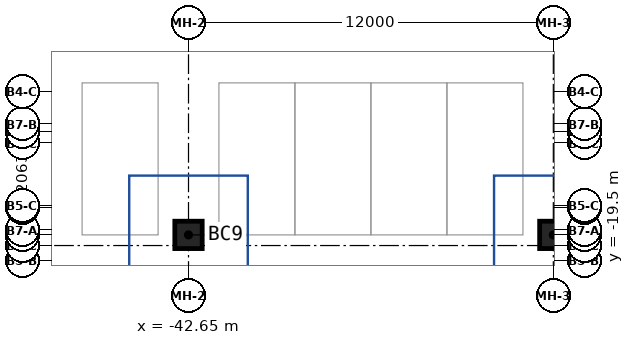
"""IFC4 building model, lengths in metres.
Left out: names, types, materials, properties, quantities, classifications, styles, units other than length and angle.
Written with IfcOpenShell. Run it as: python <this file> out.ifc"""

import sys

from ifc_helpers import new_model, si_unit, direction, frame, origin, origin_2d, place, context, subcontext, project, spatial, rectangle, extrude, source, transform, mapped, element, save


model = new_model("IFC4")
c1 = context("Model", 3, precision=1e-05, world=origin(), true_north=direction((0.0, 1.0)))
c2 = subcontext(c1, "Body", "Model", "MODEL_VIEW")
j1 = project(units=[si_unit("LENGTHUNIT", "METRE"), si_unit("PLANEANGLEUNIT", "RADIAN")], contexts=[c1])
p1 = place(None, origin())
s1 = spatial("IfcSite", under=j1, at=p1, CompositionType="ELEMENT")
p2 = place(p1, origin())
s2 = spatial("IfcBuilding", under=s1, at=p2, CompositionType="ELEMENT")
p3 = place(p2, frame((0.0, 0.0, -9.0)))
s3 = spatial("IfcBuildingStorey", under=s2, at=p3, CompositionType="ELEMENT", Elevation=-9.0)
m1 = source(origin(), c2, "Body", "SweptSolid", [
    extrude(rectangle(XDim=0.9, YDim=0.9, at=origin_2d()), origin(), (0.0, 0.0, 1.0), 4.5),
])
for number, where, z_axis, x_axis in (
    (1, (-42.65, -18.65, 0.0), (0.0, 0.0, 1.0), (1.0, 0.0, 0.0)),
    (2, (-30.65, -18.65, 0.0), (0.0, 0.0, 1.0), (1.0, 0.0, 0.0)),
):
    element("IfcColumn", number, at=place(p3, frame(where, z_axis=z_axis, x_axis=x_axis)), inside=s3, PredefinedType="COLUMN", context=c2, shape_type="MappedRepresentation", body=[
        mapped(m1, transform((0.0, 0.0, 0.0))),
    ])
save(model, sys.argv[1])
